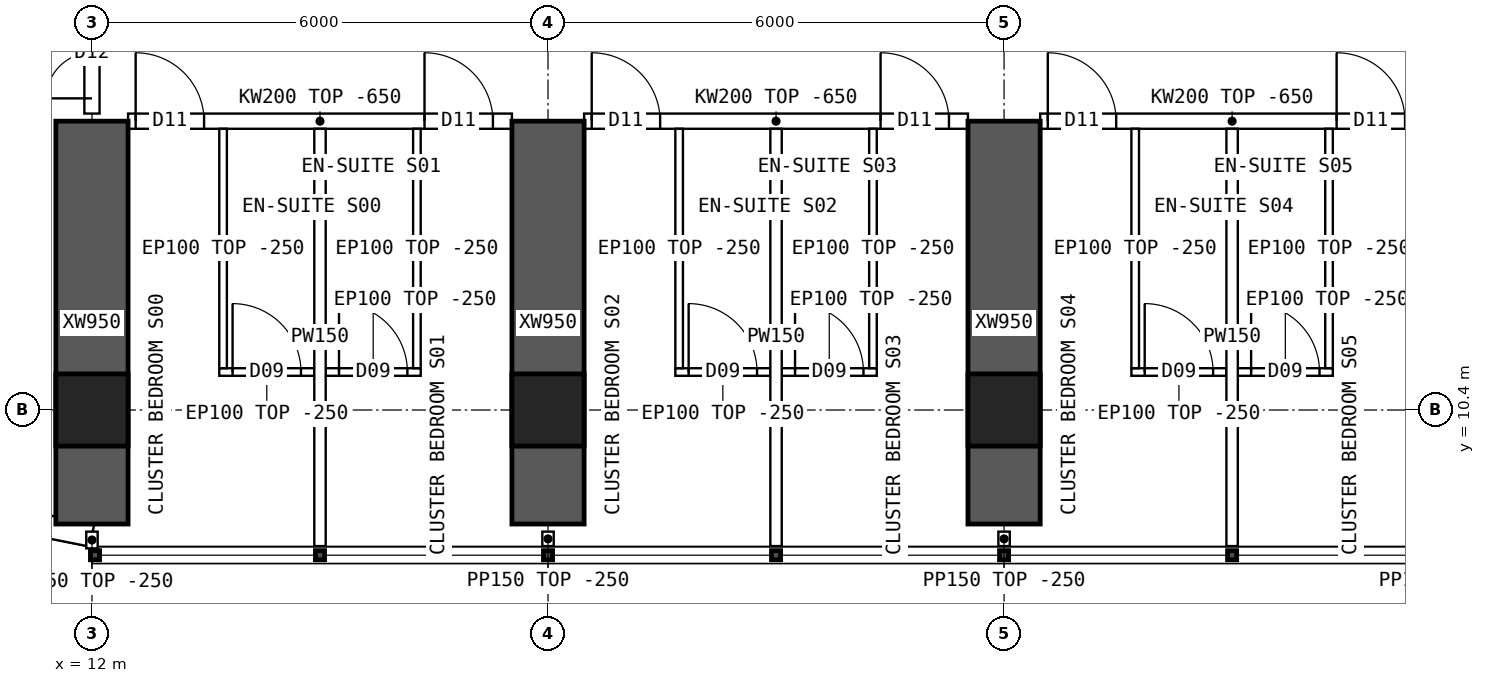
"""IFC4 building model, lengths in metres.
Left out: names, types, materials, properties, quantities, classifications, styles, units other than length and angle.
Written with IfcOpenShell. Run it as: python <this file> out.ifc"""

import sys

from ifc_helpers import new_model, si_unit, direction, frame, frame_2d, origin, origin_2d, place, context, subcontext, project, spatial, polyline, rectangle, hollow_rectangle, outline, extrude, element, fill, save


model = new_model("IFC4")
c1 = context("Model", 3, precision=1e-05, world=origin(), true_north=direction((0.0, 1.0)))
c2 = subcontext(c1, "Body", "Model", "MODEL_VIEW")
j1 = project(units=[si_unit("LENGTHUNIT", "METRE"), si_unit("PLANEANGLEUNIT", "RADIAN")], contexts=[c1])
p1 = place(None, origin())
s1 = spatial("IfcSite", under=j1, at=p1, CompositionType="ELEMENT")
p2 = place(p1, origin())
s2 = spatial("IfcBuilding", under=s1, at=p2, CompositionType="ELEMENT")
p3 = place(p2, frame((0.0, 0.0, 121.9)))
s3 = spatial("IfcBuildingStorey", under=s2, at=p3, CompositionType="ELEMENT", Elevation=121.9)
for number, where, z_axis, x_axis in (
    (1, (12.0, 10.4, 0.0), (0.0, 0.0, 1.0), (1.0, 0.0, 0.0)),
    (2, (18.0, 10.4, 0.0), (0.0, 0.0, 1.0), (1.0, 0.0, 0.0)),
    (3, (24.0, 10.4, 0.0), (0.0, 0.0, 1.0), (1.0, 0.0, 0.0)),
):
    element("IfcColumn", number, at=place(p3, frame(where, z_axis=z_axis, x_axis=x_axis)), inside=s3, PredefinedType="COLUMN", context=c2, shape_type="SweptSolid", body=[
        extrude(hollow_rectangle(XDim=0.95, YDim=0.95, WallThickness=0.095, at=origin_2d()), origin(), (0.0, 0.0, 1.0), 3.75),
    ])
for number, where, z_axis, x_axis in (
    (4, (12.0, 8.9, 0.0), (0.0, 0.0, 1.0), (0.0, 1.0, 0.0)),
    (5, (18.0, 8.9, 0.0), (0.0, 0.0, 1.0), (0.0, 1.0, 0.0)),
    (6, (24.0, 8.9, 0.0), (0.0, 0.0, 1.0), (0.0, 1.0, 0.0)),
):
    element("IfcWall", number, at=place(p3, frame(where, z_axis=z_axis, x_axis=x_axis)), inside=s3, PredefinedType="SHEAR", context=c2, shape_type="SweptSolid", body=[
        extrude(rectangle(XDim=5.3, YDim=0.95, at=frame_2d((2.65, 0.0))), origin(), (0.0, 0.0, 1.0), 3.75),
    ])
p4 = place(p3, frame((8.843, 9.378, 0.0), z_axis=(0.0, 0.0, 1.0), x_axis=(0.980787251524, -0.195080412259, 0.0)))
e7 = element("IfcWall", 7, at=p4, inside=s3, PredefinedType="SOLIDWALL", context=c2, shape_type="SweptSolid", body=[
    extrude(outline(polyline([(-0.03, -0.15), (3.249, -0.15), (3.189, 0.15), (0.03, 0.15), (-0.03, -0.15)])), origin(), (0.0, 0.0, 1.0), 3.5),
])
p5 = place(p4, frame((0.909, 0.0, 0.9)))
e8 = element("IfcOpeningElement", 8, at=p5, cuts=e7, PredefinedType="OPENING", context=c2, shape_type="SweptSolid", body=[
    extrude(rectangle(XDim=1.4, YDim=1.8, at=frame_2d((0.7, 0.9))), frame((0.0, 0.16, 0.0), z_axis=(0.0, -1.0, 0.0), x_axis=(1.0, 0.0, 0.0)), (0.0, 0.0, 1.0), 0.32),
])
p6 = place(p3, frame((12.475, 14.2, 0.0), z_axis=(0.0, 0.0, 1.0), x_axis=(1.0, 0.0, 0.0)))
e9 = element("IfcWall", 9, at=p6, inside=s3, PredefinedType="SOLIDWALL", context=c2, shape_type="SweptSolid", body=[
    extrude(outline(polyline([(0.0, 0.0), (5.05, 0.0), (5.05, 3.1), (0.0, 3.1), (0.0, 0.0)])), frame((0.0, 0.1, 0.0), z_axis=(0.0, -1.0, 0.0), x_axis=(1.0, 0.0, 0.0)), (0.0, 0.0, 1.0), 0.2),
])
p7 = place(p6, frame((0.1, 0.0, 0.0)))
e10 = element("IfcOpeningElement", 10, at=p7, cuts=e9, PredefinedType="OPENING", context=c2, shape_type="SweptSolid", body=[
    extrude(rectangle(XDim=0.9, YDim=2.1, at=frame_2d((0.45, 1.05))), frame((0.0, 0.11, 0.0), z_axis=(0.0, -1.0, 0.0), x_axis=(1.0, 0.0, 0.0)), (0.0, 0.0, 1.0), 0.22),
])
p8 = place(p6, frame((3.9, 0.0, 0.0)))
e11 = element("IfcOpeningElement", 11, at=p8, cuts=e9, PredefinedType="OPENING", context=c2, shape_type="SweptSolid", body=[
    extrude(rectangle(XDim=0.9, YDim=2.1, at=frame_2d((0.45, 1.05))), frame((0.0, 0.11, 0.0), z_axis=(0.0, -1.0, 0.0), x_axis=(1.0, 0.0, 0.0)), (0.0, 0.0, 1.0), 0.22),
])
p9 = place(p3, frame((18.475, 14.2, 0.0), z_axis=(0.0, 0.0, 1.0), x_axis=(1.0, 0.0, 0.0)))
e12 = element("IfcWall", 12, at=p9, inside=s3, PredefinedType="SOLIDWALL", context=c2, shape_type="SweptSolid", body=[
    extrude(outline(polyline([(0.0, 0.0), (5.05, 0.0), (5.05, 3.1), (0.0, 3.1), (0.0, 0.0)])), frame((0.0, 0.1, 0.0), z_axis=(0.0, -1.0, 0.0), x_axis=(1.0, 0.0, 0.0)), (0.0, 0.0, 1.0), 0.2),
])
p10 = place(p9, frame((0.1, 0.0, 0.0)))
e13 = element("IfcOpeningElement", 13, at=p10, cuts=e12, PredefinedType="OPENING", context=c2, shape_type="SweptSolid", body=[
    extrude(rectangle(XDim=0.9, YDim=2.1, at=frame_2d((0.45, 1.05))), frame((0.0, 0.11, 0.0), z_axis=(0.0, -1.0, 0.0), x_axis=(1.0, 0.0, 0.0)), (0.0, 0.0, 1.0), 0.22),
])
p11 = place(p9, frame((3.9, 0.0, 0.0)))
e14 = element("IfcOpeningElement", 14, at=p11, cuts=e12, PredefinedType="OPENING", context=c2, shape_type="SweptSolid", body=[
    extrude(rectangle(XDim=0.9, YDim=2.1, at=frame_2d((0.45, 1.05))), frame((0.0, 0.11, 0.0), z_axis=(0.0, -1.0, 0.0), x_axis=(1.0, 0.0, 0.0)), (0.0, 0.0, 1.0), 0.22),
])
p12 = place(p3, frame((24.475, 14.2, 0.0), z_axis=(0.0, 0.0, 1.0), x_axis=(1.0, 0.0, 0.0)))
e15 = element("IfcWall", 15, at=p12, inside=s3, PredefinedType="SOLIDWALL", context=c2, shape_type="SweptSolid", body=[
    extrude(outline(polyline([(0.0, 0.0), (5.05, 0.0), (5.05, 3.1), (0.0, 3.1), (0.0, 0.0)])), frame((0.0, 0.1, 0.0), z_axis=(0.0, -1.0, 0.0), x_axis=(1.0, 0.0, 0.0)), (0.0, 0.0, 1.0), 0.2),
])
p13 = place(p12, frame((0.1, 0.0, 0.0)))
e16 = element("IfcOpeningElement", 16, at=p13, cuts=e15, PredefinedType="OPENING", context=c2, shape_type="SweptSolid", body=[
    extrude(rectangle(XDim=0.9, YDim=2.1, at=frame_2d((0.45, 1.05))), frame((0.0, 0.11, 0.0), z_axis=(0.0, -1.0, 0.0), x_axis=(1.0, 0.0, 0.0)), (0.0, 0.0, 1.0), 0.22),
])
p14 = place(p12, frame((3.9, 0.0, 0.0)))
e17 = element("IfcOpeningElement", 17, at=p14, cuts=e15, PredefinedType="OPENING", context=c2, shape_type="SweptSolid", body=[
    extrude(rectangle(XDim=0.9, YDim=2.1, at=frame_2d((0.45, 1.05))), frame((0.0, 0.11, 0.0), z_axis=(0.0, -1.0, 0.0), x_axis=(1.0, 0.0, 0.0)), (0.0, 0.0, 1.0), 0.22),
])
p15 = place(p3, frame((15.0, 8.61, 0.0), z_axis=(0.0, 0.0, 1.0), x_axis=(0.0, 1.0, 0.0)))
e18 = element("IfcWall", 18, at=p15, inside=s3, PredefinedType="PARTITIONING", context=c2, shape_type="SweptSolid", body=[
    extrude(outline(polyline([(0.0, 0.0), (5.49, 0.0), (5.49, 3.1), (5.442, 3.1), (5.44, 3.5), (1.992, 3.5), (1.99, 3.1), (1.592, 3.1), (1.59, 3.5), (0.0, 3.5), (0.0, 0.0)])), frame((0.0, 0.075, 0.0), z_axis=(0.0, -1.0, 0.0), x_axis=(1.0, 0.0, 0.0)), (0.0, 0.0, 1.0), 0.15),
])
p16 = place(p3, frame((14.925, 10.9, 0.0), z_axis=(0.0, 0.0, 1.0), x_axis=(-1.0, 0.0, 0.0)))
e19 = element("IfcWall", 19, at=p16, inside=s3, PredefinedType="PARTITIONING", context=c2, shape_type="SweptSolid", body=[
    extrude(rectangle(XDim=1.25, YDim=0.1, at=frame_2d((0.625, 0.0))), origin(), (0.0, 0.0, 1.0), 3.5),
])
p17 = place(p16, frame((0.175, 0.0, 0.0)))
e20 = element("IfcOpeningElement", 20, at=p17, cuts=e19, PredefinedType="OPENING", context=c2, shape_type="SweptSolid", body=[
    extrude(rectangle(XDim=0.9, YDim=2.1, at=frame_2d((0.45, 1.05))), frame((0.0, 0.06, 0.0), z_axis=(0.0, -1.0, 0.0), x_axis=(1.0, 0.0, 0.0)), (0.0, 0.0, 1.0), 0.12),
])
p18 = place(p3, frame((13.725, 10.95, 0.0), z_axis=(0.0, 0.0, 1.0), x_axis=(0.0, 1.0, 0.0)))
e21 = element("IfcWall", 21, at=p18, inside=s3, PredefinedType="PARTITIONING", context=c2, shape_type="SweptSolid", body=[
    extrude(outline(polyline([(0.0, 0.0), (3.15, 0.0), (3.15, 3.1), (3.102, 3.1), (3.1, 3.5), (0.0, 3.5), (0.0, 0.0)])), frame((0.0, 0.05, 0.0), z_axis=(0.0, -1.0, 0.0), x_axis=(1.0, 0.0, 0.0)), (0.0, 0.0, 1.0), 0.1),
])
p19 = place(p3, frame((16.325, 10.9, 0.0), z_axis=(0.0, 0.0, 1.0), x_axis=(-1.0, 0.0, 0.0)))
e22 = element("IfcWall", 22, at=p19, inside=s3, PredefinedType="PARTITIONING", context=c2, shape_type="SweptSolid", body=[
    extrude(rectangle(XDim=1.25, YDim=0.1, at=frame_2d((0.625, 0.0))), origin(), (0.0, 0.0, 1.0), 3.5),
])
p20 = place(p19, frame((0.175, 0.0, 0.0)))
e23 = element("IfcOpeningElement", 23, at=p20, cuts=e22, PredefinedType="OPENING", context=c2, shape_type="SweptSolid", body=[
    extrude(rectangle(XDim=0.9, YDim=2.1, at=frame_2d((0.45, 1.05))), frame((0.0, 0.06, 0.0), z_axis=(0.0, -1.0, 0.0), x_axis=(1.0, 0.0, 0.0)), (0.0, 0.0, 1.0), 0.12),
])
p21 = place(p3, frame((16.275, 10.95, 0.0), z_axis=(0.0, 0.0, 1.0), x_axis=(0.0, 1.0, 0.0)))
e24 = element("IfcWall", 24, at=p21, inside=s3, PredefinedType="PARTITIONING", context=c2, shape_type="SweptSolid", body=[
    extrude(outline(polyline([(0.0, 0.0), (3.15, 0.0), (3.15, 3.1), (3.102, 3.1), (3.1, 3.5), (0.0, 3.5), (0.0, 0.0)])), frame((0.0, 0.05, 0.0), z_axis=(0.0, -1.0, 0.0), x_axis=(1.0, 0.0, 0.0)), (0.0, 0.0, 1.0), 0.1),
])
p22 = place(p3, frame((21.0, 8.61, 0.0), z_axis=(0.0, 0.0, 1.0), x_axis=(0.0, 1.0, 0.0)))
e25 = element("IfcWall", 25, at=p22, inside=s3, PredefinedType="PARTITIONING", context=c2, shape_type="SweptSolid", body=[
    extrude(outline(polyline([(0.0, 0.0), (5.49, 0.0), (5.49, 3.1), (5.442, 3.1), (5.44, 3.5), (1.992, 3.5), (1.99, 3.1), (1.592, 3.1), (1.59, 3.5), (0.0, 3.5), (0.0, 0.0)])), frame((0.0, 0.075, 0.0), z_axis=(0.0, -1.0, 0.0), x_axis=(1.0, 0.0, 0.0)), (0.0, 0.0, 1.0), 0.15),
])
p23 = place(p3, frame((20.925, 10.9, 0.0), z_axis=(0.0, 0.0, 1.0), x_axis=(-1.0, 0.0, 0.0)))
e26 = element("IfcWall", 26, at=p23, inside=s3, PredefinedType="PARTITIONING", context=c2, shape_type="SweptSolid", body=[
    extrude(rectangle(XDim=1.25, YDim=0.1, at=frame_2d((0.625, 0.0))), origin(), (0.0, 0.0, 1.0), 3.5),
])
p24 = place(p23, frame((0.175, 0.0, 0.0)))
e27 = element("IfcOpeningElement", 27, at=p24, cuts=e26, PredefinedType="OPENING", context=c2, shape_type="SweptSolid", body=[
    extrude(rectangle(XDim=0.9, YDim=2.1, at=frame_2d((0.45, 1.05))), frame((0.0, 0.06, 0.0), z_axis=(0.0, -1.0, 0.0), x_axis=(1.0, 0.0, 0.0)), (0.0, 0.0, 1.0), 0.12),
])
p25 = place(p3, frame((19.725, 10.95, 0.0), z_axis=(0.0, 0.0, 1.0), x_axis=(0.0, 1.0, 0.0)))
e28 = element("IfcWall", 28, at=p25, inside=s3, PredefinedType="PARTITIONING", context=c2, shape_type="SweptSolid", body=[
    extrude(outline(polyline([(0.0, 0.0), (3.15, 0.0), (3.15, 3.1), (3.102, 3.1), (3.1, 3.5), (0.0, 3.5), (0.0, 0.0)])), frame((0.0, 0.05, 0.0), z_axis=(0.0, -1.0, 0.0), x_axis=(1.0, 0.0, 0.0)), (0.0, 0.0, 1.0), 0.1),
])
p26 = place(p3, frame((22.325, 10.9, 0.0), z_axis=(0.0, 0.0, 1.0), x_axis=(-1.0, 0.0, 0.0)))
e29 = element("IfcWall", 29, at=p26, inside=s3, PredefinedType="PARTITIONING", context=c2, shape_type="SweptSolid", body=[
    extrude(rectangle(XDim=1.25, YDim=0.1, at=frame_2d((0.625, 0.0))), origin(), (0.0, 0.0, 1.0), 3.5),
])
p27 = place(p26, frame((0.175, 0.0, 0.0)))
e30 = element("IfcOpeningElement", 30, at=p27, cuts=e29, PredefinedType="OPENING", context=c2, shape_type="SweptSolid", body=[
    extrude(rectangle(XDim=0.9, YDim=2.1, at=frame_2d((0.45, 1.05))), frame((0.0, 0.06, 0.0), z_axis=(0.0, -1.0, 0.0), x_axis=(1.0, 0.0, 0.0)), (0.0, 0.0, 1.0), 0.12),
])
p28 = place(p3, frame((22.275, 10.95, 0.0), z_axis=(0.0, 0.0, 1.0), x_axis=(0.0, 1.0, 0.0)))
e31 = element("IfcWall", 31, at=p28, inside=s3, PredefinedType="PARTITIONING", context=c2, shape_type="SweptSolid", body=[
    extrude(outline(polyline([(0.0, 0.0), (3.15, 0.0), (3.15, 3.1), (3.102, 3.1), (3.1, 3.5), (0.0, 3.5), (0.0, 0.0)])), frame((0.0, 0.05, 0.0), z_axis=(0.0, -1.0, 0.0), x_axis=(1.0, 0.0, 0.0)), (0.0, 0.0, 1.0), 0.1),
])
p29 = place(p3, frame((27.0, 8.61, 0.0), z_axis=(0.0, 0.0, 1.0), x_axis=(0.0, 1.0, 0.0)))
e32 = element("IfcWall", 32, at=p29, inside=s3, PredefinedType="PARTITIONING", context=c2, shape_type="SweptSolid", body=[
    extrude(outline(polyline([(0.0, 0.0), (5.49, 0.0), (5.49, 3.1), (5.442, 3.1), (5.44, 3.5), (1.992, 3.5), (1.99, 3.1), (1.592, 3.1), (1.59, 3.5), (0.0, 3.5), (0.0, 0.0)])), frame((0.0, 0.075, 0.0), z_axis=(0.0, -1.0, 0.0), x_axis=(1.0, 0.0, 0.0)), (0.0, 0.0, 1.0), 0.15),
])
p30 = place(p3, frame((26.925, 10.9, 0.0), z_axis=(0.0, 0.0, 1.0), x_axis=(-1.0, 0.0, 0.0)))
e33 = element("IfcWall", 33, at=p30, inside=s3, PredefinedType="PARTITIONING", context=c2, shape_type="SweptSolid", body=[
    extrude(rectangle(XDim=1.25, YDim=0.1, at=frame_2d((0.625, 0.0))), origin(), (0.0, 0.0, 1.0), 3.5),
])
p31 = place(p30, frame((0.175, 0.0, 0.0)))
e34 = element("IfcOpeningElement", 34, at=p31, cuts=e33, PredefinedType="OPENING", context=c2, shape_type="SweptSolid", body=[
    extrude(rectangle(XDim=0.9, YDim=2.1, at=frame_2d((0.45, 1.05))), frame((0.0, 0.06, 0.0), z_axis=(0.0, -1.0, 0.0), x_axis=(1.0, 0.0, 0.0)), (0.0, 0.0, 1.0), 0.12),
])
p32 = place(p3, frame((25.725, 10.95, 0.0), z_axis=(0.0, 0.0, 1.0), x_axis=(0.0, 1.0, 0.0)))
e35 = element("IfcWall", 35, at=p32, inside=s3, PredefinedType="PARTITIONING", context=c2, shape_type="SweptSolid", body=[
    extrude(outline(polyline([(0.0, 0.0), (3.15, 0.0), (3.15, 3.1), (3.102, 3.1), (3.1, 3.5), (0.0, 3.5), (0.0, 0.0)])), frame((0.0, 0.05, 0.0), z_axis=(0.0, -1.0, 0.0), x_axis=(1.0, 0.0, 0.0)), (0.0, 0.0, 1.0), 0.1),
])
p33 = place(p3, frame((28.325, 10.9, 0.0), z_axis=(0.0, 0.0, 1.0), x_axis=(-1.0, 0.0, 0.0)))
e36 = element("IfcWall", 36, at=p33, inside=s3, PredefinedType="PARTITIONING", context=c2, shape_type="SweptSolid", body=[
    extrude(rectangle(XDim=1.25, YDim=0.1, at=frame_2d((0.625, 0.0))), origin(), (0.0, 0.0, 1.0), 3.5),
])
p34 = place(p33, frame((0.175, 0.0, 0.0)))
e37 = element("IfcOpeningElement", 37, at=p34, cuts=e36, PredefinedType="OPENING", context=c2, shape_type="SweptSolid", body=[
    extrude(rectangle(XDim=0.9, YDim=2.1, at=frame_2d((0.45, 1.05))), frame((0.0, 0.06, 0.0), z_axis=(0.0, -1.0, 0.0), x_axis=(1.0, 0.0, 0.0)), (0.0, 0.0, 1.0), 0.12),
])
p35 = place(p3, frame((28.275, 10.95, 0.0), z_axis=(0.0, 0.0, 1.0), x_axis=(0.0, 1.0, 0.0)))
e38 = element("IfcWall", 38, at=p35, inside=s3, PredefinedType="PARTITIONING", context=c2, shape_type="SweptSolid", body=[
    extrude(outline(polyline([(0.0, 0.0), (3.15, 0.0), (3.15, 3.1), (3.102, 3.1), (3.1, 3.5), (0.0, 3.5), (0.0, 0.0)])), frame((0.0, 0.05, 0.0), z_axis=(0.0, -1.0, 0.0), x_axis=(1.0, 0.0, 0.0)), (0.0, 0.0, 1.0), 0.1),
])
p36 = place(p3, frame((12.0, 14.3, 0.0), z_axis=(0.0, 0.0, 1.0), x_axis=(0.0, 1.0, 0.0)))
e39 = element("IfcWall", 39, at=p36, inside=s3, PredefinedType="SOLIDWALL", context=c2, shape_type="SweptSolid", body=[
    extrude(outline(polyline([(0.0, 0.0), (1.6, 0.0), (1.6, 3.1), (0.0, 3.1), (0.0, 0.0)])), frame((0.0, 0.1, 0.0), z_axis=(0.0, -1.0, 0.0), x_axis=(1.0, 0.0, 0.0)), (0.0, 0.0, 1.0), 0.2),
])
p37 = place(p36, frame((0.2, 0.0, 0.0)))
e40 = element("IfcOpeningElement", 40, at=p37, cuts=e39, PredefinedType="OPENING", context=c2, shape_type="SweptSolid", body=[
    extrude(rectangle(XDim=1.2, YDim=2.1, at=frame_2d((0.6, 1.05))), frame((0.0, 0.11, 0.0), z_axis=(0.0, -1.0, 0.0), x_axis=(1.0, 0.0, 0.0)), (0.0, 0.0, 1.0), 0.22),
])
p38 = place(p3, frame((12.0, 8.8, 0.0), z_axis=(0.0, 0.0, 1.0), x_axis=(0.0, -1.0, 0.0)))
e41 = element("IfcWall", 41, at=p38, inside=s3, PredefinedType="PARTITIONING", context=c2, shape_type="SweptSolid", body=[
    extrude(rectangle(XDim=0.22, YDim=0.15, at=frame_2d((0.11, 0.0))), origin(), (0.0, 0.0, 1.0), 3.5),
])
for number, where, z_axis, x_axis in (
    (42, (18.0, 8.8, 0.0), (0.0, 0.0, 1.0), (0.0, -1.0, 0.0)),
    (43, (24.0, 8.8, 0.0), (0.0, 0.0, 1.0), (0.0, -1.0, 0.0)),
):
    element("IfcWall", number, at=place(p3, frame(where, z_axis=z_axis, x_axis=x_axis)), inside=s3, PredefinedType="PARTITIONING", context=c2, shape_type="SweptSolid", body=[
        extrude(rectangle(XDim=0.19, YDim=0.15, at=frame_2d((0.095, 0.0))), origin(), (0.0, 0.0, 1.0), 3.5),
    ])
p39 = place(p17, origin())
e44 = element("IfcDoor", 44, at=p39, inside=s3, OperationType="SINGLE_SWING_RIGHT", PredefinedType="DOOR", context=c2, shape_type="SweptSolid", body=[
    extrude(rectangle(XDim=0.9, YDim=2.1, at=frame_2d((0.45, 1.05))), frame((0.0, 0.025, 0.0), z_axis=(0.0, -1.0, 0.0), x_axis=(1.0, 0.0, 0.0)), (0.0, 0.0, 1.0), 0.05),
])
fill(e20, e44)
p40 = place(p7, origin())
e45 = element("IfcDoor", 45, at=p40, inside=s3, OperationType="SINGLE_SWING_LEFT", PredefinedType="DOOR", context=c2, shape_type="SweptSolid", body=[
    extrude(rectangle(XDim=0.9, YDim=2.1, at=frame_2d((0.45, 1.05))), frame((0.0, 0.025, 0.0), z_axis=(0.0, -1.0, 0.0), x_axis=(1.0, 0.0, 0.0)), (0.0, 0.0, 1.0), 0.05),
])
fill(e10, e45)
p41 = place(p20, origin())
e46 = element("IfcDoor", 46, at=p41, inside=s3, OperationType="SINGLE_SWING_RIGHT", PredefinedType="DOOR", context=c2, shape_type="SweptSolid", body=[
    extrude(rectangle(XDim=0.9, YDim=2.1, at=frame_2d((0.45, 1.05))), frame((0.0, 0.025, 0.0), z_axis=(0.0, -1.0, 0.0), x_axis=(1.0, 0.0, 0.0)), (0.0, 0.0, 1.0), 0.05),
])
fill(e23, e46)
p42 = place(p8, origin())
e47 = element("IfcDoor", 47, at=p42, inside=s3, OperationType="SINGLE_SWING_LEFT", PredefinedType="DOOR", context=c2, shape_type="SweptSolid", body=[
    extrude(rectangle(XDim=0.9, YDim=2.1, at=frame_2d((0.45, 1.05))), frame((0.0, 0.025, 0.0), z_axis=(0.0, -1.0, 0.0), x_axis=(1.0, 0.0, 0.0)), (0.0, 0.0, 1.0), 0.05),
])
fill(e11, e47)
p43 = place(p24, origin())
e48 = element("IfcDoor", 48, at=p43, inside=s3, OperationType="SINGLE_SWING_RIGHT", PredefinedType="DOOR", context=c2, shape_type="SweptSolid", body=[
    extrude(rectangle(XDim=0.9, YDim=2.1, at=frame_2d((0.45, 1.05))), frame((0.0, 0.025, 0.0), z_axis=(0.0, -1.0, 0.0), x_axis=(1.0, 0.0, 0.0)), (0.0, 0.0, 1.0), 0.05),
])
fill(e27, e48)
p44 = place(p10, origin())
e49 = element("IfcDoor", 49, at=p44, inside=s3, OperationType="SINGLE_SWING_LEFT", PredefinedType="DOOR", context=c2, shape_type="SweptSolid", body=[
    extrude(rectangle(XDim=0.9, YDim=2.1, at=frame_2d((0.45, 1.05))), frame((0.0, 0.025, 0.0), z_axis=(0.0, -1.0, 0.0), x_axis=(1.0, 0.0, 0.0)), (0.0, 0.0, 1.0), 0.05),
])
fill(e13, e49)
p45 = place(p27, origin())
e50 = element("IfcDoor", 50, at=p45, inside=s3, OperationType="SINGLE_SWING_RIGHT", PredefinedType="DOOR", context=c2, shape_type="SweptSolid", body=[
    extrude(rectangle(XDim=0.9, YDim=2.1, at=frame_2d((0.45, 1.05))), frame((0.0, 0.025, 0.0), z_axis=(0.0, -1.0, 0.0), x_axis=(1.0, 0.0, 0.0)), (0.0, 0.0, 1.0), 0.05),
])
fill(e30, e50)
p46 = place(p11, origin())
e51 = element("IfcDoor", 51, at=p46, inside=s3, OperationType="SINGLE_SWING_LEFT", PredefinedType="DOOR", context=c2, shape_type="SweptSolid", body=[
    extrude(rectangle(XDim=0.9, YDim=2.1, at=frame_2d((0.45, 1.05))), frame((0.0, 0.025, 0.0), z_axis=(0.0, -1.0, 0.0), x_axis=(1.0, 0.0, 0.0)), (0.0, 0.0, 1.0), 0.05),
])
fill(e14, e51)
p47 = place(p31, origin())
e52 = element("IfcDoor", 52, at=p47, inside=s3, OperationType="SINGLE_SWING_RIGHT", PredefinedType="DOOR", context=c2, shape_type="SweptSolid", body=[
    extrude(rectangle(XDim=0.9, YDim=2.1, at=frame_2d((0.45, 1.05))), frame((0.0, 0.025, 0.0), z_axis=(0.0, -1.0, 0.0), x_axis=(1.0, 0.0, 0.0)), (0.0, 0.0, 1.0), 0.05),
])
fill(e34, e52)
p48 = place(p13, origin())
e53 = element("IfcDoor", 53, at=p48, inside=s3, OperationType="SINGLE_SWING_LEFT", PredefinedType="DOOR", context=c2, shape_type="SweptSolid", body=[
    extrude(rectangle(XDim=0.9, YDim=2.1, at=frame_2d((0.45, 1.05))), frame((0.0, 0.025, 0.0), z_axis=(0.0, -1.0, 0.0), x_axis=(1.0, 0.0, 0.0)), (0.0, 0.0, 1.0), 0.05),
])
fill(e16, e53)
p49 = place(p34, origin())
e54 = element("IfcDoor", 54, at=p49, inside=s3, OperationType="SINGLE_SWING_RIGHT", PredefinedType="DOOR", context=c2, shape_type="SweptSolid", body=[
    extrude(rectangle(XDim=0.9, YDim=2.1, at=frame_2d((0.45, 1.05))), frame((0.0, 0.025, 0.0), z_axis=(0.0, -1.0, 0.0), x_axis=(1.0, 0.0, 0.0)), (0.0, 0.0, 1.0), 0.05),
])
fill(e37, e54)
p50 = place(p14, origin())
e55 = element("IfcDoor", 55, at=p50, inside=s3, OperationType="SINGLE_SWING_LEFT", PredefinedType="DOOR", context=c2, shape_type="SweptSolid", body=[
    extrude(rectangle(XDim=0.9, YDim=2.1, at=frame_2d((0.45, 1.05))), frame((0.0, 0.025, 0.0), z_axis=(0.0, -1.0, 0.0), x_axis=(1.0, 0.0, 0.0)), (0.0, 0.0, 1.0), 0.05),
])
fill(e17, e55)
p51 = place(p37, origin())
e56 = element("IfcDoor", 56, at=p51, inside=s3, OperationType="DOUBLE_DOOR_SINGLE_SWING", PredefinedType="DOOR", context=c2, shape_type="SweptSolid", body=[
    extrude(rectangle(XDim=1.2, YDim=2.1, at=frame_2d((0.6, 1.05))), frame((0.0, 0.025, 0.0), z_axis=(0.0, -1.0, 0.0), x_axis=(1.0, 0.0, 0.0)), (0.0, 0.0, 1.0), 0.05),
])
fill(e40, e56)
save(model, sys.argv[1])
